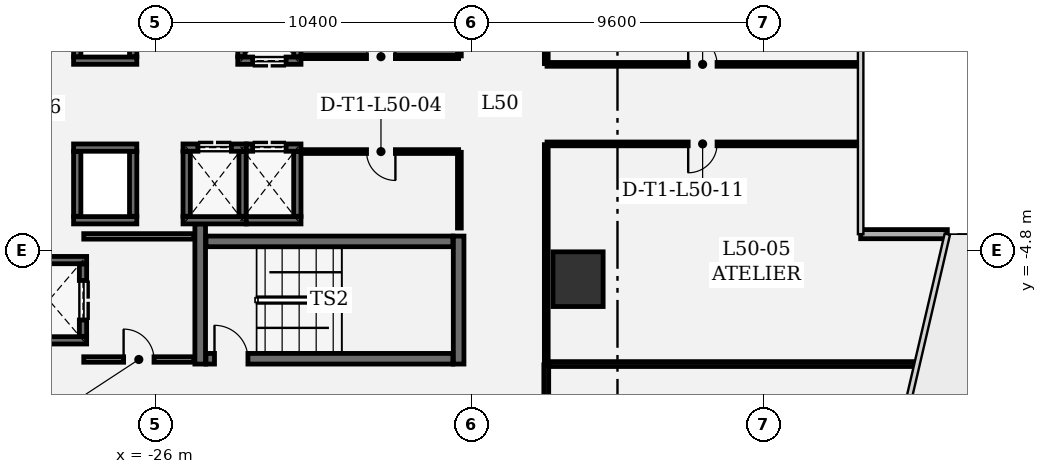
"""IFC4 building model, lengths in metres.
Left out: names, types, materials, properties, quantities, classifications, styles, units other than length and angle.
Written with IfcOpenShell. Run it as: python <this file> out.ifc"""

import sys

from ifc_helpers import new_model, si_unit, direction, frame, frame_2d, origin, origin_2d, place, context, subcontext, project, spatial, rectangle, extrude, element, fill, save


model = new_model("IFC4")
c1 = context("Model", 3, precision=1e-05, world=origin(), true_north=direction((0.0, 1.0)))
c2 = subcontext(c1, "Body", "Model", "MODEL_VIEW")
j1 = project(units=[si_unit("LENGTHUNIT", "METRE"), si_unit("PLANEANGLEUNIT", "RADIAN")], contexts=[c1])
p1 = place(None, origin())
s1 = spatial("IfcSite", under=j1, at=p1, CompositionType="ELEMENT")
p2 = place(p1, origin())
s2 = spatial("IfcBuilding", under=s1, at=p2, CompositionType="ELEMENT")
p3 = place(p2, frame((0.0, 0.0, 217.2)))
s3 = spatial("IfcBuildingStorey", under=s2, at=p3, CompositionType="ELEMENT", Elevation=217.2)
p4 = place(p3, frame((-12.097, -5.758, 0.0), z_axis=(0.0, 0.0, 1.0), x_axis=(1.0, 0.0, 0.0)))
e1 = element("IfcColumn", 1, at=p4, inside=s3, PredefinedType="COLUMN", context=c2, shape_type="SweptSolid", body=[
    extrude(rectangle(XDim=1.65, YDim=1.8, at=origin_2d()), origin(), (0.0, 0.0, 1.0), 4.05),
])
p5 = place(p3, frame((0.05, -4.277, 0.0), z_axis=(0.0, 0.0, 1.0), x_axis=(-1.0, 0.0, 0.0)))
e2 = element("IfcWall", 2, at=p5, inside=s3, PredefinedType="SOLIDWALL", context=c2, shape_type="SweptSolid", body=[
    extrude(rectangle(XDim=2.851, YDim=0.3, at=frame_2d((1.426, 0.0))), origin(), (0.0, 0.0, 1.0), 3.78),
])
p6 = place(p3, frame((-24.525, -3.94, 0.0), z_axis=(0.0, 0.0, 1.0), x_axis=(0.0, -1.0, 0.0)))
e3 = element("IfcWall", 3, at=p6, inside=s3, PredefinedType="SHEAR", context=c2, shape_type="SweptSolid", body=[
    extrude(rectangle(XDim=4.61, YDim=0.35, at=frame_2d((2.305, 0.0))), origin(), (0.0, 0.0, 1.0), 3.78),
])
p7 = place(p3, frame((-16.025, -8.55, 0.0), z_axis=(0.0, 0.0, 1.0), x_axis=(0.0, 1.0, 0.0)))
e4 = element("IfcWall", 4, at=p7, inside=s3, PredefinedType="SHEAR", context=c2, shape_type="SweptSolid", body=[
    extrude(rectangle(XDim=4.21, YDim=0.35, at=frame_2d((2.105, 0.0))), origin(), (0.0, 0.0, 1.0), 3.78),
])
p8 = place(p3, frame((-24.335, -8.375, 0.0), z_axis=(0.0, 0.0, 1.0), x_axis=(1.0, 0.0, 0.0)))
e5 = element("IfcWall", 5, at=p8, inside=s3, PredefinedType="SHEAR", context=c2, shape_type="SweptSolid", body=[
    extrude(rectangle(XDim=8.12, YDim=0.35, at=frame_2d((4.06, 0.0))), origin(), (0.0, 0.0, 1.0), 3.78),
])
p9 = place(p8, frame((0.28, 0.0, 0.0)))
e6 = element("IfcOpeningElement", 6, at=p9, cuts=e5, PredefinedType="OPENING", context=c2, shape_type="SweptSolid", body=[
    extrude(rectangle(XDim=1.1, YDim=2.2, at=frame_2d((0.55, 1.1))), frame((0.0, 0.185, 0.0), z_axis=(0.0, -1.0, 0.0), x_axis=(1.0, 0.0, 0.0)), (0.0, 0.0, 1.0), 0.37),
])
p10 = place(p3, frame((-16.215, -4.515, 0.0), z_axis=(0.0, 0.0, 1.0), x_axis=(-1.0, 0.0, 0.0)))
e7 = element("IfcWall", 7, at=p10, inside=s3, PredefinedType="SHEAR", context=c2, shape_type="SweptSolid", body=[
    extrude(rectangle(XDim=8.12, YDim=0.35, at=frame_2d((4.06, 0.0))), origin(), (0.0, 0.0, 1.0), 3.78),
])
for number, where, z_axis, x_axis in (
    (8, (-28.26, -7.77, 0.0), (0.0, 0.0, 1.0), (-1.0, 0.0, 0.0)),
    (9, (-30.74, -5.13, 0.0), (0.0, 0.0, 1.0), (1.0, 0.0, 0.0)),
):
    element("IfcWall", number, at=place(p3, frame(where, z_axis=z_axis, x_axis=x_axis)), inside=s3, PredefinedType="SHEAR", context=c2, shape_type="SweptSolid", body=[
        extrude(rectangle(XDim=2.48, YDim=0.24, at=frame_2d((1.24, 0.0))), origin(), (0.0, 0.0, 1.0), 3.78),
    ])
p11 = place(p3, frame((-28.38, -5.262, 0.0), z_axis=(0.0, 0.0, 1.0), x_axis=(0.0, -1.0, 0.0)))
e10 = element("IfcWall", 10, at=p11, inside=s3, PredefinedType="SHEAR", context=c2, shape_type="SweptSolid", body=[
    extrude(rectangle(XDim=2.376, YDim=0.24, at=frame_2d((1.188, 0.0))), origin(), (0.0, 0.0, 1.0), 3.78),
])
p12 = place(p11, frame((0.538, 0.0, 0.0)))
e11 = element("IfcOpeningElement", 11, at=p12, cuts=e10, PredefinedType="OPENING", context=c2, shape_type="SweptSolid", body=[
    extrude(rectangle(XDim=1.3, YDim=2.3, at=frame_2d((0.65, 1.15))), frame((0.0, 0.13, 0.0), z_axis=(0.0, -1.0, 0.0), x_axis=(1.0, 0.0, 0.0)), (0.0, 0.0, 1.0), 0.26),
])
p13 = place(p3, frame((-26.61, 1.43, 0.0), z_axis=(0.0, 0.0, 1.0), x_axis=(-1.0, 0.0, 0.0)))
e12 = element("IfcWall", 12, at=p13, inside=s3, PredefinedType="SHEAR", context=c2, shape_type="SweptSolid", body=[
    extrude(rectangle(XDim=2.08, YDim=0.24, at=frame_2d((1.04, 0.0))), origin(), (0.0, 0.0, 1.0), 3.78),
])
for number, where, z_axis, x_axis in (
    (13, (-28.57, 1.562, 0.0), (0.0, 0.0, 1.0), (0.0, 1.0, 0.0)),
    (14, (-26.73, 3.688, 0.0), (0.0, 0.0, 1.0), (0.0, -1.0, 0.0)),
):
    element("IfcWall", number, at=place(p3, frame(where, z_axis=z_axis, x_axis=x_axis)), inside=s3, PredefinedType="SHEAR", context=c2, shape_type="SweptSolid", body=[
        extrude(rectangle(XDim=2.126, YDim=0.24, at=frame_2d((1.063, 0.0))), origin(), (0.0, 0.0, 1.0), 3.78),
    ])
p14 = place(p3, frame((-21.21, 1.43, 0.0), z_axis=(0.0, 0.0, 1.0), x_axis=(-1.0, 0.0, 0.0)))
e15 = element("IfcWall", 15, at=p14, inside=s3, PredefinedType="SHEAR", context=c2, shape_type="SweptSolid", body=[
    extrude(rectangle(XDim=2.08, YDim=0.24, at=frame_2d((1.04, 0.0))), origin(), (0.0, 0.0, 1.0), 3.78),
])
p15 = place(p14, frame((0.49, 0.0, 0.0)))
e16 = element("IfcOpeningElement", 16, at=p15, cuts=e15, PredefinedType="OPENING", context=c2, shape_type="SweptSolid", body=[
    extrude(rectangle(XDim=1.1, YDim=2.2, at=frame_2d((0.55, 1.1))), frame((0.0, 0.13, 0.0), z_axis=(0.0, -1.0, 0.0), x_axis=(1.0, 0.0, 0.0)), (0.0, 0.0, 1.0), 0.26),
])
for number, where, z_axis, x_axis in (
    (17, (-23.17, 1.562, 0.0), (0.0, 0.0, 1.0), (0.0, 1.0, 0.0)),
    (18, (-21.33, 3.688, 0.0), (0.0, 0.0, 1.0), (0.0, -1.0, 0.0)),
):
    element("IfcWall", number, at=place(p3, frame(where, z_axis=z_axis, x_axis=x_axis)), inside=s3, PredefinedType="SHEAR", context=c2, shape_type="SweptSolid", body=[
        extrude(rectangle(XDim=2.126, YDim=0.24, at=frame_2d((1.063, 0.0))), origin(), (0.0, 0.0, 1.0), 3.78),
    ])
for number, where, z_axis, x_axis in (
    (19, (-26.61, -3.82, 0.0), (0.0, 0.0, 1.0), (-1.0, 0.0, 0.0)),
    (20, (-28.69, -1.43, 0.0), (0.0, 0.0, 1.0), (1.0, 0.0, 0.0)),
):
    element("IfcWall", number, at=place(p3, frame(where, z_axis=z_axis, x_axis=x_axis)), inside=s3, PredefinedType="SHEAR", context=c2, shape_type="SweptSolid", body=[
        extrude(rectangle(XDim=2.08, YDim=0.24, at=frame_2d((1.04, 0.0))), origin(), (0.0, 0.0, 1.0), 3.78),
    ])
for number, where, z_axis, x_axis in (
    (21, (-28.57, -3.688, 0.0), (0.0, 0.0, 1.0), (0.0, 1.0, 0.0)),
    (22, (-26.73, -1.562, 0.0), (0.0, 0.0, 1.0), (0.0, -1.0, 0.0)),
):
    element("IfcWall", number, at=place(p3, frame(where, z_axis=z_axis, x_axis=x_axis)), inside=s3, PredefinedType="SHEAR", context=c2, shape_type="SweptSolid", body=[
        extrude(rectangle(XDim=2.126, YDim=0.24, at=frame_2d((1.063, 0.0))), origin(), (0.0, 0.0, 1.0), 3.78),
    ])
p16 = place(p3, frame((-23.01, -3.82, 0.0), z_axis=(0.0, 0.0, 1.0), x_axis=(-1.0, 0.0, 0.0)))
e23 = element("IfcWall", 23, at=p16, inside=s3, PredefinedType="SHEAR", context=c2, shape_type="SweptSolid", body=[
    extrude(rectangle(XDim=2.08, YDim=0.24, at=frame_2d((1.04, 0.0))), origin(), (0.0, 0.0, 1.0), 3.78),
])
p17 = place(p3, frame((-25.09, -1.43, 0.0), z_axis=(0.0, 0.0, 1.0), x_axis=(1.0, 0.0, 0.0)))
e24 = element("IfcWall", 24, at=p17, inside=s3, PredefinedType="SHEAR", context=c2, shape_type="SweptSolid", body=[
    extrude(rectangle(XDim=2.08, YDim=0.24, at=frame_2d((1.04, 0.0))), origin(), (0.0, 0.0, 1.0), 3.78),
])
p18 = place(p17, frame((0.49, 0.0, 0.0)))
e25 = element("IfcOpeningElement", 25, at=p18, cuts=e24, PredefinedType="OPENING", context=c2, shape_type="SweptSolid", body=[
    extrude(rectangle(XDim=1.1, YDim=2.2, at=frame_2d((0.55, 1.1))), frame((0.0, 0.13, 0.0), z_axis=(0.0, -1.0, 0.0), x_axis=(1.0, 0.0, 0.0)), (0.0, 0.0, 1.0), 0.26),
])
for number, where, z_axis, x_axis in (
    (26, (-24.97, -3.688, 0.0), (0.0, 0.0, 1.0), (0.0, 1.0, 0.0)),
    (27, (-23.13, -1.562, 0.0), (0.0, 0.0, 1.0), (0.0, -1.0, 0.0)),
):
    element("IfcWall", number, at=place(p3, frame(where, z_axis=z_axis, x_axis=x_axis)), inside=s3, PredefinedType="SHEAR", context=c2, shape_type="SweptSolid", body=[
        extrude(rectangle(XDim=2.126, YDim=0.24, at=frame_2d((1.063, 0.0))), origin(), (0.0, 0.0, 1.0), 3.78),
    ])
p19 = place(p3, frame((-21.21, -3.82, 0.0), z_axis=(0.0, 0.0, 1.0), x_axis=(-1.0, 0.0, 0.0)))
e28 = element("IfcWall", 28, at=p19, inside=s3, PredefinedType="SHEAR", context=c2, shape_type="SweptSolid", body=[
    extrude(rectangle(XDim=1.8, YDim=0.24, at=frame_2d((0.9, 0.0))), origin(), (0.0, 0.0, 1.0), 3.78),
])
p20 = place(p3, frame((-23.01, -1.43, 0.0), z_axis=(0.0, 0.0, 1.0), x_axis=(1.0, 0.0, 0.0)))
e29 = element("IfcWall", 29, at=p20, inside=s3, PredefinedType="SHEAR", context=c2, shape_type="SweptSolid", body=[
    extrude(rectangle(XDim=1.8, YDim=0.24, at=frame_2d((0.9, 0.0))), origin(), (0.0, 0.0, 1.0), 3.78),
])
p21 = place(p20, frame((0.21, 0.0, 0.0)))
e30 = element("IfcOpeningElement", 30, at=p21, cuts=e29, PredefinedType="OPENING", context=c2, shape_type="SweptSolid", body=[
    extrude(rectangle(XDim=1.1, YDim=2.2, at=frame_2d((0.55, 1.1))), frame((0.0, 0.13, 0.0), z_axis=(0.0, -1.0, 0.0), x_axis=(1.0, 0.0, 0.0)), (0.0, 0.0, 1.0), 0.26),
])
p22 = place(p3, frame((-21.33, -1.562, 0.0), z_axis=(0.0, 0.0, 1.0), x_axis=(0.0, -1.0, 0.0)))
e31 = element("IfcWall", 31, at=p22, inside=s3, PredefinedType="SHEAR", context=c2, shape_type="SweptSolid", body=[
    extrude(rectangle(XDim=2.126, YDim=0.24, at=frame_2d((1.063, 0.0))), origin(), (0.0, 0.0, 1.0), 3.78),
])
p23 = place(p3, frame((-28.355, -8.4, 0.0), z_axis=(0.0, 0.0, 1.0), x_axis=(1.0, 0.0, 0.0)))
e32 = element("IfcWall", 32, at=p23, inside=s3, PredefinedType="PARTITIONING", context=c2, shape_type="SweptSolid", body=[
    extrude(rectangle(XDim=3.622, YDim=0.18, at=frame_2d((1.811, 0.0))), origin(), (0.0, 0.0, 1.0), 3.78),
])
p24 = place(p23, frame((1.311, 0.0, 0.0)))
e33 = element("IfcOpeningElement", 33, at=p24, cuts=e32, PredefinedType="OPENING", context=c2, shape_type="SweptSolid", body=[
    extrude(rectangle(XDim=1.0, YDim=2.15, at=frame_2d((0.5, 1.075))), frame((0.0, 0.1, 0.0), z_axis=(0.0, -1.0, 0.0), x_axis=(1.0, 0.0, 0.0)), (0.0, 0.0, 1.0), 0.2),
])
p25 = place(p3, frame((-24.733, -4.35, 0.0), z_axis=(0.0, 0.0, 1.0), x_axis=(-1.0, 0.0, 0.0)))
e34 = element("IfcWall", 34, at=p25, inside=s3, PredefinedType="PARTITIONING", context=c2, shape_type="SweptSolid", body=[
    extrude(rectangle(XDim=3.622, YDim=0.18, at=frame_2d((1.811, 0.0))), origin(), (0.0, 0.0, 1.0), 3.78),
])
p26 = place(p3, frame((-21.134, 1.56, 0.0), z_axis=(0.0, 0.0, 1.0), x_axis=(1.0, 0.0, 0.0)))
e35 = element("IfcWall", 35, at=p26, inside=s3, PredefinedType="PARTITIONING", context=c2, shape_type="SweptSolid", body=[
    extrude(rectangle(XDim=5.109, YDim=0.125, at=frame_2d((2.554, 0.0))), origin(), (0.0, 0.0, 1.0), 3.78),
])
p27 = place(p26, frame((2.079, 0.0, 0.0)))
e36 = element("IfcOpeningElement", 36, at=p27, cuts=e35, PredefinedType="OPENING", context=c2, shape_type="SweptSolid", body=[
    extrude(rectangle(XDim=0.95, YDim=2.15, at=frame_2d((0.475, 1.075))), frame((0.0, 0.073, 0.0), z_axis=(0.0, -1.0, 0.0), x_axis=(1.0, 0.0, 0.0)), (0.0, 0.0, 1.0), 0.145),
])
p28 = place(p3, frame((-16.0, 1.585, 0.0), z_axis=(0.0, 0.0, 1.0), x_axis=(0.0, 1.0, 0.0)))
e37 = element("IfcWall", 37, at=p28, inside=s3, PredefinedType="PARTITIONING", context=c2, shape_type="SweptSolid", body=[
    extrude(rectangle(XDim=2.302, YDim=0.125, at=frame_2d((1.151, 0.0))), origin(), (0.0, 0.0, 1.0), 3.78),
])
p29 = place(p3, frame((-16.0, -4.075, 0.0), z_axis=(0.0, 0.0, 1.0), x_axis=(0.0, 1.0, 0.0)))
e38 = element("IfcWall", 38, at=p29, inside=s3, PredefinedType="PARTITIONING", context=c2, shape_type="SweptSolid", body=[
    extrude(rectangle(XDim=2.49, YDim=0.125, at=frame_2d((1.245, 0.0))), origin(), (0.0, 0.0, 1.0), 3.78),
])
p30 = place(p3, frame((-16.025, -1.56, 0.0), z_axis=(0.0, 0.0, 1.0), x_axis=(-1.0, 0.0, 0.0)))
e39 = element("IfcWall", 39, at=p30, inside=s3, PredefinedType="PARTITIONING", context=c2, shape_type="SweptSolid", body=[
    extrude(rectangle(XDim=5.109, YDim=0.125, at=frame_2d((2.554, 0.0))), origin(), (0.0, 0.0, 1.0), 3.78),
])
p31 = place(p30, frame((2.079, 0.0, 0.0)))
e40 = element("IfcOpeningElement", 40, at=p31, cuts=e39, PredefinedType="OPENING", context=c2, shape_type="SweptSolid", body=[
    extrude(rectangle(XDim=0.95, YDim=2.15, at=frame_2d((0.475, 1.075))), frame((0.0, 0.073, 0.0), z_axis=(0.0, -1.0, 0.0), x_axis=(1.0, 0.0, 0.0)), (0.0, 0.0, 1.0), 0.145),
])
p32 = place(p3, frame((-1.026, -8.55, 0.0), z_axis=(0.0, 0.0, 1.0), x_axis=(-1.0, 0.0, 0.0)))
e41 = element("IfcWall", 41, at=p32, inside=s3, PredefinedType="PARTITIONING", context=c2, shape_type="SweptSolid", body=[
    extrude(rectangle(XDim=12.091, YDim=0.16, at=frame_2d((6.045, 0.0))), origin(), (0.0, 0.0, 1.0), 3.344),
])
p33 = place(p3, frame((-13.142, -10.933, 0.0), z_axis=(0.0, 0.0, 1.0), x_axis=(0.0, 1.0, 0.0)))
e42 = element("IfcWall", 42, at=p33, inside=s3, PredefinedType="PARTITIONING", context=c2, shape_type="SweptSolid", body=[
    extrude(rectangle(XDim=2.358, YDim=0.16, at=frame_2d((1.179, 0.0))), origin(), (0.0, 0.0, 1.0), 3.0),
])
p34 = place(p3, frame((-2.882, -1.308, 0.0), z_axis=(0.0, 0.0, 1.0), x_axis=(-1.0, 0.0, 0.0)))
e43 = element("IfcWall", 43, at=p34, inside=s3, PredefinedType="PARTITIONING", context=c2, shape_type="SweptSolid", body=[
    extrude(rectangle(XDim=10.236, YDim=0.125, at=frame_2d((5.118, 0.0))), origin(), (0.0, 0.0, 1.0), 3.78),
])
p35 = place(p34, frame((4.643, 0.0, 0.0)))
e44 = element("IfcOpeningElement", 44, at=p35, cuts=e43, PredefinedType="OPENING", context=c2, shape_type="SweptSolid", body=[
    extrude(rectangle(XDim=0.95, YDim=2.15, at=frame_2d((0.475, 1.075))), frame((0.0, 0.073, 0.0), z_axis=(0.0, -1.0, 0.0), x_axis=(1.0, 0.0, 0.0)), (0.0, 0.0, 1.0), 0.145),
])
p36 = place(p3, frame((-13.142, -1.333, 0.0), z_axis=(0.0, 0.0, 1.0), x_axis=(0.0, -1.0, 0.0)))
e45 = element("IfcWall", 45, at=p36, inside=s3, PredefinedType="PARTITIONING", context=c2, shape_type="SweptSolid", body=[
    extrude(rectangle(XDim=7.184, YDim=0.125, at=frame_2d((3.592, 0.0))), origin(), (0.0, 0.0, 1.0), 3.0),
])
p37 = place(p3, frame((-13.142, 8.317, 0.0), z_axis=(0.0, 0.0, 1.0), x_axis=(0.0, -1.0, 0.0)))
e46 = element("IfcWall", 46, at=p37, inside=s3, PredefinedType="PARTITIONING", context=c2, shape_type="SweptSolid", body=[
    extrude(rectangle(XDim=6.984, YDim=0.125, at=frame_2d((3.492, 0.0))), origin(), (0.0, 0.0, 1.0), 3.0),
])
p38 = place(p3, frame((-13.117, 1.308, 0.0), z_axis=(0.0, 0.0, 1.0), x_axis=(1.0, 0.0, 0.0)))
e47 = element("IfcWall", 47, at=p38, inside=s3, PredefinedType="PARTITIONING", context=c2, shape_type="SweptSolid", body=[
    extrude(rectangle(XDim=10.236, YDim=0.125, at=frame_2d((5.118, 0.0))), origin(), (0.0, 0.0, 1.0), 3.78),
])
p39 = place(p38, frame((4.643, 0.0, 0.0)))
e48 = element("IfcOpeningElement", 48, at=p39, cuts=e47, PredefinedType="OPENING", context=c2, shape_type="SweptSolid", body=[
    extrude(rectangle(XDim=0.95, YDim=2.15, at=frame_2d((0.475, 1.075))), frame((0.0, 0.073, 0.0), z_axis=(0.0, -1.0, 0.0), x_axis=(1.0, 0.0, 0.0)), (0.0, 0.0, 1.0), 0.145),
])
p40 = place(p9, origin())
e49 = element("IfcDoor", 49, at=p40, inside=s3, OperationType="SINGLE_SWING_LEFT", PredefinedType="DOOR", context=c2, shape_type="SweptSolid", body=[
    extrude(rectangle(XDim=1.1, YDim=2.2, at=frame_2d((0.55, 1.1))), frame((0.0, 0.025, 0.0), z_axis=(0.0, -1.0, 0.0), x_axis=(1.0, 0.0, 0.0)), (0.0, 0.0, 1.0), 0.05),
])
fill(e6, e49)
p41 = place(p12, origin())
e50 = element("IfcDoor", 50, at=p41, inside=s3, OperationType="DOUBLE_DOOR_SLIDING", PredefinedType="DOOR", context=c2, shape_type="SweptSolid", body=[
    extrude(rectangle(XDim=1.3, YDim=2.3, at=frame_2d((0.65, 1.15))), frame((0.0, 0.025, 0.0), z_axis=(0.0, -1.0, 0.0), x_axis=(1.0, 0.0, 0.0)), (0.0, 0.0, 1.0), 0.05),
])
fill(e11, e50)
p42 = place(p15, origin())
e51 = element("IfcDoor", 51, at=p42, inside=s3, OperationType="DOUBLE_DOOR_SLIDING", PredefinedType="DOOR", context=c2, shape_type="SweptSolid", body=[
    extrude(rectangle(XDim=1.1, YDim=2.2, at=frame_2d((0.55, 1.1))), frame((0.0, 0.025, 0.0), z_axis=(0.0, -1.0, 0.0), x_axis=(1.0, 0.0, 0.0)), (0.0, 0.0, 1.0), 0.05),
])
fill(e16, e51)
p43 = place(p18, origin())
e52 = element("IfcDoor", 52, at=p43, inside=s3, OperationType="DOUBLE_DOOR_SLIDING", PredefinedType="DOOR", context=c2, shape_type="SweptSolid", body=[
    extrude(rectangle(XDim=1.1, YDim=2.2, at=frame_2d((0.55, 1.1))), frame((0.0, 0.025, 0.0), z_axis=(0.0, -1.0, 0.0), x_axis=(1.0, 0.0, 0.0)), (0.0, 0.0, 1.0), 0.05),
])
fill(e25, e52)
p44 = place(p21, origin())
e53 = element("IfcDoor", 53, at=p44, inside=s3, OperationType="DOUBLE_DOOR_SLIDING", PredefinedType="DOOR", context=c2, shape_type="SweptSolid", body=[
    extrude(rectangle(XDim=1.1, YDim=2.2, at=frame_2d((0.55, 1.1))), frame((0.0, 0.025, 0.0), z_axis=(0.0, -1.0, 0.0), x_axis=(1.0, 0.0, 0.0)), (0.0, 0.0, 1.0), 0.05),
])
fill(e30, e53)
p45 = place(p27, origin())
e54 = element("IfcDoor", 54, at=p45, inside=s3, OperationType="SINGLE_SWING_RIGHT", PredefinedType="DOOR", context=c2, shape_type="SweptSolid", body=[
    extrude(rectangle(XDim=0.95, YDim=2.15, at=frame_2d((0.475, 1.075))), frame((0.0, 0.025, 0.0), z_axis=(0.0, -1.0, 0.0), x_axis=(1.0, 0.0, 0.0)), (0.0, 0.0, 1.0), 0.05),
])
fill(e36, e54)
p46 = place(p31, origin())
e55 = element("IfcDoor", 55, at=p46, inside=s3, OperationType="SINGLE_SWING_LEFT", PredefinedType="DOOR", context=c2, shape_type="SweptSolid", body=[
    extrude(rectangle(XDim=0.95, YDim=2.15, at=frame_2d((0.475, 1.075))), frame((0.0, 0.025, 0.0), z_axis=(0.0, -1.0, 0.0), x_axis=(1.0, 0.0, 0.0)), (0.0, 0.0, 1.0), 0.05),
])
fill(e40, e55)
p47 = place(p35, origin())
e56 = element("IfcDoor", 56, at=p47, inside=s3, OperationType="SINGLE_SWING_RIGHT", PredefinedType="DOOR", context=c2, shape_type="SweptSolid", body=[
    extrude(rectangle(XDim=0.95, YDim=2.15, at=frame_2d((0.475, 1.075))), frame((0.0, 0.025, 0.0), z_axis=(0.0, -1.0, 0.0), x_axis=(1.0, 0.0, 0.0)), (0.0, 0.0, 1.0), 0.05),
])
fill(e44, e56)
p48 = place(p39, origin())
e57 = element("IfcDoor", 57, at=p48, inside=s3, OperationType="SINGLE_SWING_LEFT", PredefinedType="DOOR", context=c2, shape_type="SweptSolid", body=[
    extrude(rectangle(XDim=0.95, YDim=2.15, at=frame_2d((0.475, 1.075))), frame((0.0, 0.025, 0.0), z_axis=(0.0, -1.0, 0.0), x_axis=(1.0, 0.0, 0.0)), (0.0, 0.0, 1.0), 0.05),
])
fill(e48, e57)
p49 = place(p24, origin())
e58 = element("IfcDoor", 58, at=p49, inside=s3, OperationType="SINGLE_SWING_LEFT", PredefinedType="DOOR", context=c2, shape_type="SweptSolid", body=[
    extrude(rectangle(XDim=1.0, YDim=2.15, at=frame_2d((0.5, 1.075))), frame((0.0, 0.025, 0.0), z_axis=(0.0, -1.0, 0.0), x_axis=(1.0, 0.0, 0.0)), (0.0, 0.0, 1.0), 0.05),
])
fill(e33, e58)
save(model, sys.argv[1])
